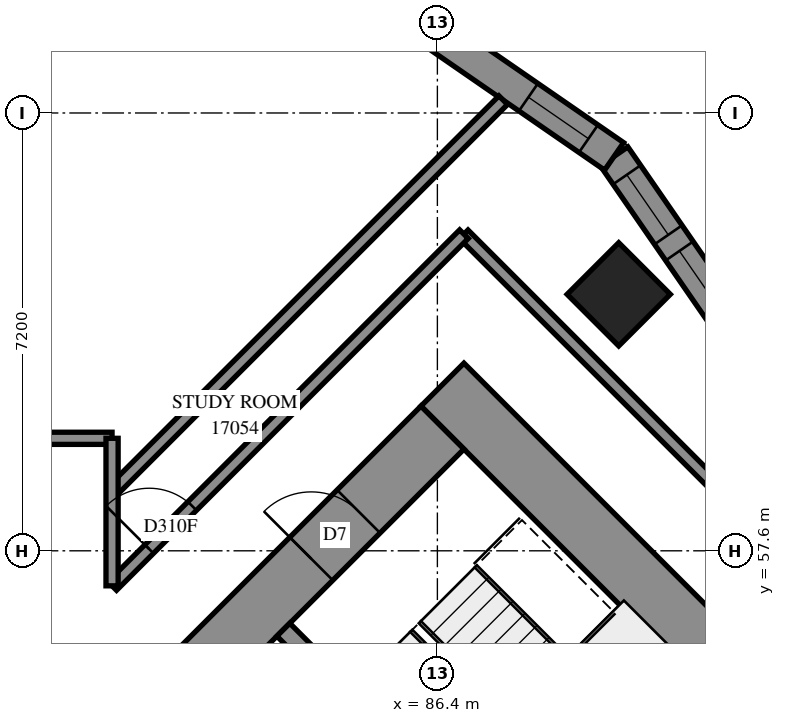
"""IFC4 building model, lengths in metres.
Left out: names, types, materials, properties, quantities, classifications, styles, units other than length and angle.
Written with IfcOpenShell. Run it as: python <this file> out.ifc"""

import sys

from ifc_helpers import new_model, si_unit, direction, frame, frame_2d, origin, origin_2d, place, context, subcontext, project, spatial, polyline, rectangle, outline, extrude, element, fill, save


model = new_model("IFC4")
c1 = context("Model", 3, precision=1e-05, world=origin(), true_north=direction((0.0, 1.0)))
c2 = subcontext(c1, "Body", "Model", "MODEL_VIEW")
j1 = project(units=[si_unit("LENGTHUNIT", "METRE"), si_unit("PLANEANGLEUNIT", "RADIAN")], contexts=[c1])
p1 = place(None, origin())
s1 = spatial("IfcSite", under=j1, at=p1, CompositionType="ELEMENT")
p2 = place(p1, origin())
s2 = spatial("IfcBuilding", under=s1, at=p2, CompositionType="ELEMENT")
p3 = place(p2, frame((0.0, 0.0, 64.4)))
s3 = spatial("IfcBuildingStorey", under=s2, at=p3, CompositionType="ELEMENT", Elevation=64.4)
p4 = place(p3, frame((89.382, 61.818, 0.0), z_axis=(0.0, 0.0, 1.0), x_axis=(0.7071067812, -0.7071067812, 0.0)))
e1 = element("IfcColumn", 1, at=p4, inside=s3, PredefinedType="COLUMN", context=c2, shape_type="SweptSolid", body=[
    extrude(rectangle(XDim=1.2, YDim=1.2, at=origin_2d()), origin(), (0.0, 0.0, 1.0), 3.1),
])
p5 = place(p3, frame((86.483, 60.333, -0.3), z_axis=(0.0, 0.0, 1.0), x_axis=(0.70710983, -0.7071037324, 0.0)))
e2 = element("IfcWall", 2, at=p5, inside=s3, PredefinedType="SHEAR", context=c2, shape_type="SweptSolid", body=[
    extrude(rectangle(XDim=16.4, YDim=1.0, at=frame_2d((8.2, 0.0))), origin(), (0.0, 0.0, 1.0), 2.7),
])
p6 = place(p5, frame((11.0, 0.0, 0.3)))
e3 = element("IfcOpeningElement", 3, at=p6, cuts=e2, PredefinedType="OPENING", context=c2, shape_type="SweptSolid", body=[
    extrude(rectangle(XDim=0.8, YDim=2.1, at=frame_2d((0.4, 1.05))), frame((0.0, 0.51, 0.0), z_axis=(0.0, -1.0, 0.0), x_axis=(1.0, 0.0, 0.0)), (0.0, 0.0, 1.0), 1.02),
])
p7 = place(p3, frame((76.301, 49.443, -0.3), z_axis=(0.0, 0.0, 1.0), x_axis=(0.7071067812, 0.7071067812, 0.0)))
e4 = element("IfcWall", 4, at=p7, inside=s3, PredefinedType="SHEAR", context=c2, shape_type="SweptSolid", body=[
    extrude(rectangle(XDim=14.4, YDim=1.0, at=frame_2d((7.2, 0.0))), origin(), (0.0, 0.0, 1.0), 2.7),
])
p8 = place(p7, frame((4.55, 0.0, 0.3)))
e5 = element("IfcOpeningElement", 5, at=p8, cuts=e4, PredefinedType="OPENING", context=c2, shape_type="SweptSolid", body=[
    extrude(rectangle(XDim=1.1, YDim=2.1, at=frame_2d((0.55, 1.05))), frame((0.0, 0.51, 0.0), z_axis=(0.0, -1.0, 0.0), x_axis=(1.0, 0.0, 0.0)), (0.0, 0.0, 1.0), 1.02),
])
p9 = place(p7, frame((11.35, 0.0, 0.3)))
e6 = element("IfcOpeningElement", 6, at=p9, cuts=e4, PredefinedType="OPENING", context=c2, shape_type="SweptSolid", body=[
    extrude(rectangle(XDim=1.1, YDim=2.1, at=frame_2d((0.55, 1.05))), frame((0.0, 0.51, 0.0), z_axis=(0.0, -1.0, 0.0), x_axis=(1.0, 0.0, 0.0)), (0.0, 0.0, 1.0), 1.02),
])
p10 = place(p3, frame((83.867, 56.302, 0.0), z_axis=(0.0, 0.0, 1.0), x_axis=(0.7071137256, -0.7070998367, 0.0)))
e7 = element("IfcWall", 7, at=p10, inside=s3, PredefinedType="SOLIDWALL", context=c2, shape_type="SweptSolid", body=[
    extrude(rectangle(XDim=7.2, YDim=0.3, at=frame_2d((3.6, 0.0))), origin(), (0.0, 0.0, 1.0), 3.1),
])
p11 = place(p3, frame((91.292, 61.21, 0.0), z_axis=(0.0, 0.0, 1.0), x_axis=(-0.5680892359, 0.8229669617, 0.0)))
e8 = element("IfcWall", 8, at=p11, inside=s3, PredefinedType="SOLIDWALL", context=c2, shape_type="SweptSolid", body=[
    extrude(outline(polyline([(0.05, -0.275), (3.546, -0.275), (3.445, 0.275), (-0.05, 0.275), (0.05, -0.275)])), origin(), (0.0, 0.0, 1.0), 3.1),
])
p12 = place(p11, frame((0.405, 0.0, 0.5)))
e9 = element("IfcOpeningElement", 9, at=p12, cuts=e8, PredefinedType="OPENING", context=c2, shape_type="SweptSolid", body=[
    extrude(rectangle(XDim=1.2, YDim=2.45, at=frame_2d((0.6, 1.225))), frame((0.0, 0.285, 0.0), z_axis=(0.0, -1.0, 0.0), x_axis=(1.0, 0.0, 0.0)), (0.0, 0.0, 1.0), 0.57),
])
p13 = place(p11, frame((1.927, 0.0, 0.5)))
e10 = element("IfcOpeningElement", 10, at=p13, cuts=e8, PredefinedType="OPENING", context=c2, shape_type="SweptSolid", body=[
    extrude(rectangle(XDim=1.2, YDim=2.45, at=frame_2d((0.6, 1.225))), frame((0.0, 0.285, 0.0), z_axis=(0.0, -1.0, 0.0), x_axis=(1.0, 0.0, 0.0)), (0.0, 0.0, 1.0), 0.57),
])
p14 = place(p3, frame((89.306, 64.086, 0.0), z_axis=(0.0, 0.0, 1.0), x_axis=(-0.8229669617, 0.5680892359, 0.0)))
e11 = element("IfcWall", 11, at=p14, inside=s3, PredefinedType="SOLIDWALL", context=c2, shape_type="SweptSolid", body=[
    extrude(outline(polyline([(-0.05, -0.275), (3.445, -0.275), (3.546, 0.275), (0.05, 0.275), (-0.05, -0.275)])), origin(), (0.0, 0.0, 1.0), 3.1),
])
p15 = place(p14, frame((0.512, 0.0, 0.5)))
e12 = element("IfcOpeningElement", 12, at=p15, cuts=e11, PredefinedType="OPENING", context=c2, shape_type="SweptSolid", body=[
    extrude(rectangle(XDim=1.2, YDim=2.45, at=frame_2d((0.6, 1.225))), frame((0.0, 0.285, 0.0), z_axis=(0.0, -1.0, 0.0), x_axis=(1.0, 0.0, 0.0)), (0.0, 0.0, 1.0), 0.57),
])
p16 = place(p3, frame((86.833, 62.805, 0.0), z_axis=(0.0, 0.0, 1.0), x_axis=(0.7072045138, -0.7070090351, 0.0)))
e13 = element("IfcWall", 13, at=p16, inside=s3, PredefinedType="PARTITIONING", context=c2, shape_type="SweptSolid", body=[
    extrude(rectangle(XDim=13.301, YDim=0.2, at=frame_2d((6.65, 0.0))), origin(), (0.0, 0.0, 1.0), 3.1),
])
p17 = place(p16, frame((10.586, 0.0, 0.0)))
e14 = element("IfcOpeningElement", 14, at=p17, cuts=e13, PredefinedType="OPENING", context=c2, shape_type="SweptSolid", body=[
    extrude(rectangle(XDim=1.0, YDim=2.1, at=frame_2d((0.5, 1.05))), frame((0.0, 0.11, 0.0), z_axis=(0.0, -1.0, 0.0), x_axis=(1.0, 0.0, 0.0)), (0.0, 0.0, 1.0), 0.22),
])
p18 = place(p3, frame((81.049, 58.577, 0.0), z_axis=(0.0, 0.0, 1.0), x_axis=(0.7071067812, 0.7071067812, 0.0)))
e15 = element("IfcWall", 15, at=p18, inside=s3, PredefinedType="PARTITIONING", context=c2, shape_type="SweptSolid", body=[
    extrude(rectangle(XDim=9.099, YDim=0.2, at=frame_2d((4.55, 0.0))), origin(), (0.0, 0.0, 1.0), 3.1),
])
p19 = place(p3, frame((81.053, 57.021, 0.0), z_axis=(0.0, 0.0, 1.0), x_axis=(0.7069845395, 0.7072290017, 0.0)))
e16 = element("IfcWall", 16, at=p19, inside=s3, PredefinedType="PARTITIONING", context=c2, shape_type="SweptSolid", body=[
    extrude(rectangle(XDim=8.181, YDim=0.2, at=frame_2d((4.091, 0.0))), origin(), (0.0, 0.0, 1.0), 3.1),
])
p20 = place(p19, frame((0.86, 0.0, 0.0)))
e17 = element("IfcOpeningElement", 17, at=p20, cuts=e16, PredefinedType="OPENING", context=c2, shape_type="SweptSolid", body=[
    extrude(rectangle(XDim=1.0, YDim=2.1, at=frame_2d((0.5, 1.05))), frame((0.0, 0.11, 0.0), z_axis=(0.0, -1.0, 0.0), x_axis=(1.0, 0.0, 0.0)), (0.0, 0.0, 1.0), 0.22),
])
p21 = place(p3, frame((77.352, 59.45, 0.0), z_axis=(0.0, 0.0, 1.0), x_axis=(1.0, 0.0, 0.0)))
e18 = element("IfcWall", 18, at=p21, inside=s3, PredefinedType="PARTITIONING", context=c2, shape_type="SweptSolid", body=[
    extrude(rectangle(XDim=3.698, YDim=0.2, at=frame_2d((1.849, 0.0))), origin(), (0.0, 0.0, 1.0), 3.1),
])
p22 = place(p3, frame((81.05, 57.024, 0.0), z_axis=(0.0, 0.0, 1.0), x_axis=(0.0, 1.0, 0.0)))
e19 = element("IfcWall", 19, at=p22, inside=s3, PredefinedType="PARTITIONING", context=c2, shape_type="SweptSolid", body=[
    extrude(rectangle(XDim=2.426, YDim=0.2, at=frame_2d((1.213, 0.0))), origin(), (0.0, 0.0, 1.0), 3.1),
])
p23 = place(p12, origin())
e20 = element("IfcWindow", 20, at=p23, inside=s3, PartitioningType="SINGLE_PANEL", PredefinedType="WINDOW", context=c2, shape_type="SweptSolid", body=[
    extrude(rectangle(XDim=1.2, YDim=2.45, at=frame_2d((0.6, 1.225))), frame((0.0, 0.155, 0.0), z_axis=(0.0, -1.0, 0.0), x_axis=(1.0, 0.0, 0.0)), (0.0, 0.0, 1.0), 0.06),
])
fill(e9, e20)
p24 = place(p13, origin())
e21 = element("IfcWindow", 21, at=p24, inside=s3, PartitioningType="SINGLE_PANEL", PredefinedType="WINDOW", context=c2, shape_type="SweptSolid", body=[
    extrude(rectangle(XDim=1.2, YDim=2.45, at=frame_2d((0.6, 1.225))), frame((0.0, 0.155, 0.0), z_axis=(0.0, -1.0, 0.0), x_axis=(1.0, 0.0, 0.0)), (0.0, 0.0, 1.0), 0.06),
])
fill(e10, e21)
p25 = place(p15, origin())
e22 = element("IfcWindow", 22, at=p25, inside=s3, PartitioningType="SINGLE_PANEL", PredefinedType="WINDOW", context=c2, shape_type="SweptSolid", body=[
    extrude(rectangle(XDim=1.2, YDim=2.45, at=frame_2d((0.6, 1.225))), frame((0.0, 0.155, 0.0), z_axis=(0.0, -1.0, 0.0), x_axis=(1.0, 0.0, 0.0)), (0.0, 0.0, 1.0), 0.06),
])
fill(e12, e22)
p26 = place(p9, origin())
e23 = element("IfcDoor", 23, at=p26, inside=s3, OperationType="SINGLE_SWING_LEFT", PredefinedType="DOOR", context=c2, shape_type="SweptSolid", body=[
    extrude(rectangle(XDim=1.1, YDim=2.1, at=frame_2d((0.55, 1.05))), frame((0.0, 0.025, 0.0), z_axis=(0.0, -1.0, 0.0), x_axis=(1.0, 0.0, 0.0)), (0.0, 0.0, 1.0), 0.05),
])
fill(e6, e23)
p27 = place(p20, origin())
e24 = element("IfcDoor", 24, at=p27, inside=s3, OperationType="SINGLE_SWING_RIGHT", PredefinedType="DOOR", context=c2, shape_type="SweptSolid", body=[
    extrude(rectangle(XDim=1.0, YDim=2.1, at=frame_2d((0.5, 1.05))), frame((0.0, 0.025, 0.0), z_axis=(0.0, -1.0, 0.0), x_axis=(1.0, 0.0, 0.0)), (0.0, 0.0, 1.0), 0.05),
])
fill(e17, e24)
save(model, sys.argv[1])
